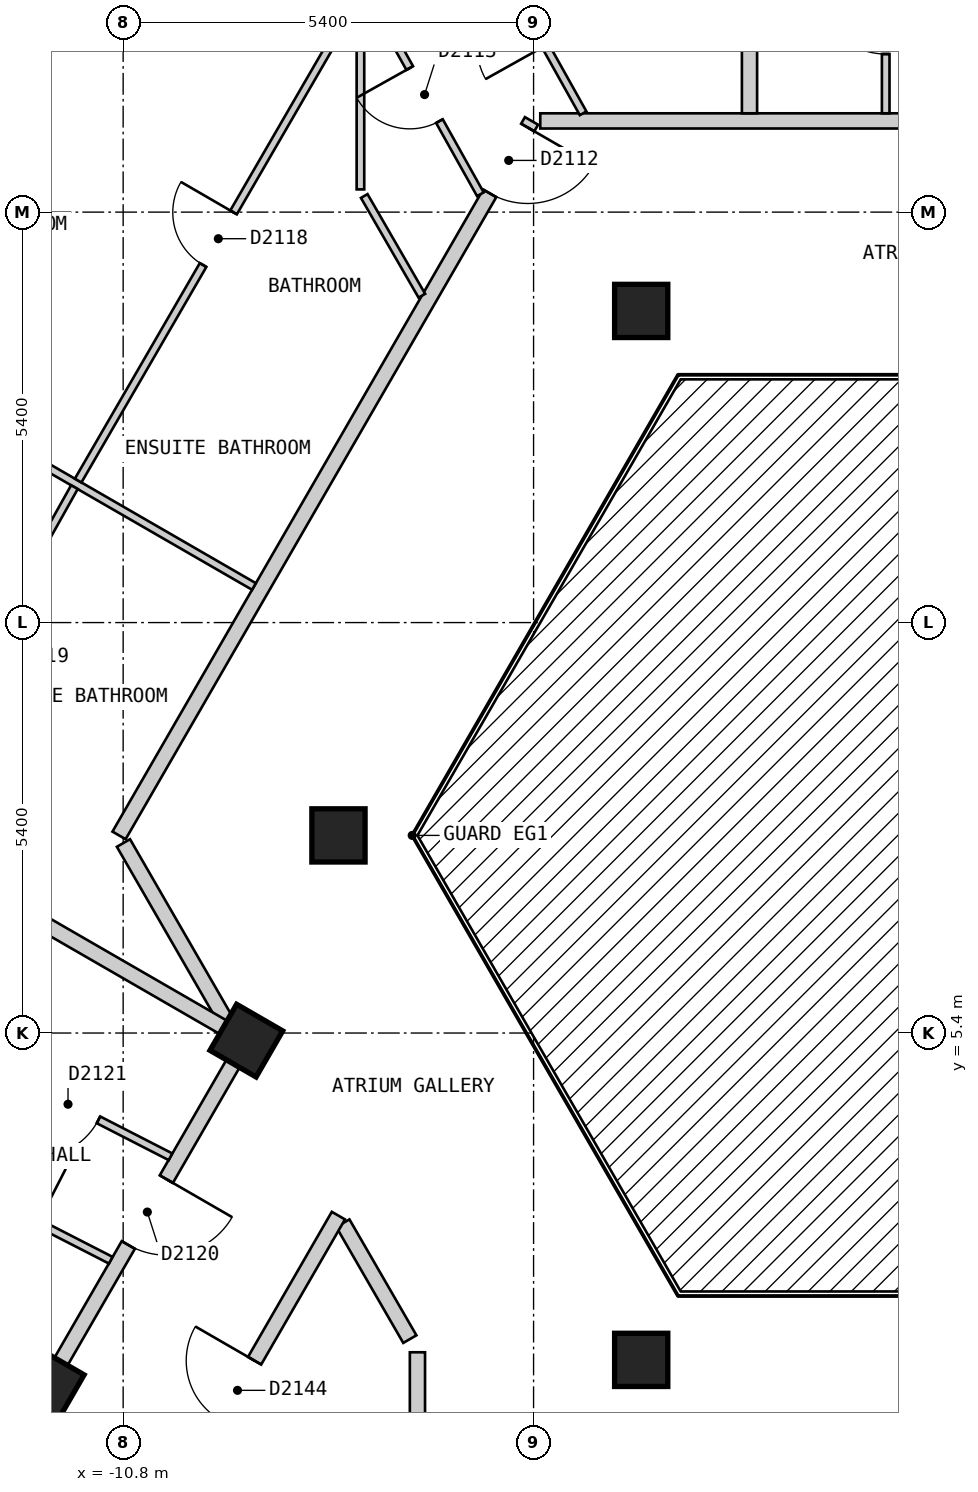
"""IFC4 building model, lengths in metres.
Left out: names, types, materials, properties, quantities, classifications, styles, units other than length and angle.
Written with IfcOpenShell. Run it as: python <this file> out.ifc"""

import sys

from ifc_helpers import new_model, si_unit, direction, frame, frame_2d, origin, origin_2d, place, context, subcontext, project, spatial, rectangle, extrude, element, fill, save


model = new_model("IFC4")
c1 = context("Model", 3, precision=1e-05, world=origin(), true_north=direction((0.0, 1.0)))
c2 = subcontext(c1, "Body", "Model", "MODEL_VIEW")
j1 = project(units=[si_unit("LENGTHUNIT", "METRE"), si_unit("PLANEANGLEUNIT", "RADIAN")], contexts=[c1])
p1 = place(None, origin())
s1 = spatial("IfcSite", under=j1, at=p1, CompositionType="ELEMENT")
p2 = place(p1, origin())
s2 = spatial("IfcBuilding", under=s1, at=p2, CompositionType="ELEMENT")
p3 = place(p2, frame((0.0, 0.0, 217.8)))
s3 = spatial("IfcBuildingStorey", under=s2, at=p3, CompositionType="ELEMENT", Elevation=217.8)
for number, where, z_axis, x_axis in (
    (1, (-3.984, 14.9, 0.0), (0.0, 0.0, 1.0), (1.0, 0.0, 0.0)),
    (2, (-7.967, 8.0, 0.0), (0.0, 0.0, 1.0), (1.0, 0.0, 0.0)),
    (3, (-9.179, 5.3, 0.0), (0.0, 0.0, 1.0), (-0.5, -0.866, 0.0)),
    (4, (-3.984, 1.1, 0.0), (0.0, 0.0, 1.0), (1.0, 0.0, 0.0)),
    (5, (-11.792, 0.775, 0.0), (0.0, 0.0, 1.0), (-0.5, -0.866, 0.0)),
):
    element("IfcColumn", number, at=place(p3, frame(where, z_axis=z_axis, x_axis=x_axis)), inside=s3, PredefinedType="COLUMN", context=c2, shape_type="SweptSolid", body=[
        extrude(rectangle(XDim=0.7, YDim=0.7, at=origin_2d()), origin(), (0.0, 0.0, 1.0), 3.0),
    ])
p4 = place(p3, frame((-10.796, 7.9, 0.0), z_axis=(0.0, 0.0, 1.0), x_axis=(0.499698840221, -0.866199208659, 0.0)))
e6 = element("IfcWall", 6, at=p4, inside=s3, PredefinedType="PARTITIONING", context=c2, shape_type="SweptSolid", body=[
    extrude(rectangle(XDim=2.685, YDim=0.2, at=frame_2d((1.343, 0.0))), origin(), (0.0, 0.0, 1.0), 2.7),
])
p5 = place(p3, frame((-7.909, 2.898, 0.0), z_axis=(0.0, 0.0, 1.0), x_axis=(0.50019444547, -0.865913111531, 0.0)))
e7 = element("IfcWall", 7, at=p5, inside=s3, PredefinedType="PARTITIONING", context=c2, shape_type="SweptSolid", body=[
    extrude(rectangle(XDim=1.761, YDim=0.2, at=frame_2d((0.88, 0.0))), origin(), (0.0, 0.0, 1.0), 2.7),
])
p6 = place(p3, frame((-5.312, 17.4, 0.0), z_axis=(0.0, 0.0, 1.0), x_axis=(1.0, 0.0, 0.0)))
e8 = element("IfcWall", 8, at=p6, inside=s3, PredefinedType="PARTITIONING", context=c2, shape_type="SweptSolid", body=[
    extrude(rectangle(XDim=10.739, YDim=0.2, at=frame_2d((5.37, 0.0))), origin(), (0.0, 0.0, 1.0), 2.7),
])
p7 = place(p6, frame((9.534, 0.0, 0.0)))
e9 = element("IfcOpeningElement", 9, at=p7, cuts=e8, PredefinedType="OPENING", context=c2, shape_type="SweptSolid", body=[
    extrude(rectangle(XDim=1.0, YDim=2.1, at=frame_2d((0.5, 1.05))), frame((0.0, 0.11, 0.0), z_axis=(0.0, -1.0, 0.0), x_axis=(1.0, 0.0, 0.0)), (0.0, 0.0, 1.0), 0.22),
])
p8 = place(p6, frame((4.812, 0.0, 0.0)))
e10 = element("IfcOpeningElement", 10, at=p8, cuts=e8, PredefinedType="OPENING", context=c2, shape_type="SweptSolid", body=[
    extrude(rectangle(XDim=1.0, YDim=2.1, at=frame_2d((0.5, 1.05))), frame((0.0, 0.11, 0.0), z_axis=(0.0, -1.0, 0.0), x_axis=(1.0, 0.0, 0.0)), (0.0, 0.0, 1.0), 0.22),
])
p9 = place(p3, frame((-10.623, -1.6, 0.0), z_axis=(0.0, 0.0, 1.0), x_axis=(0.500040865889, 0.866001808567, 0.0)))
e11 = element("IfcWall", 11, at=p9, inside=s3, PredefinedType="PARTITIONING", context=c2, shape_type="SweptSolid", body=[
    extrude(rectangle(XDim=5.31, YDim=0.2, at=frame_2d((2.655, 0.0))), origin(), (0.0, 0.0, 1.0), 2.7),
])
p10 = place(p9, frame((2.205, 0.0, 0.0)))
e12 = element("IfcOpeningElement", 12, at=p10, cuts=e11, PredefinedType="OPENING", context=c2, shape_type="SweptSolid", body=[
    extrude(rectangle(XDim=0.9, YDim=2.1, at=frame_2d((0.45, 1.05))), frame((0.0, 0.11, 0.0), z_axis=(0.0, -1.0, 0.0), x_axis=(1.0, 0.0, 0.0)), (0.0, 0.0, 1.0), 0.22),
])
p11 = place(p3, frame((-13.106, -1.5, 0.0), z_axis=(0.0, 0.0, 1.0), x_axis=(0.500025705601, 0.86601056214, 0.0)))
e13 = element("IfcWall", 13, at=p11, inside=s3, PredefinedType="PARTITIONING", context=c2, shape_type="SweptSolid", body=[
    extrude(rectangle(XDim=7.735, YDim=0.2, at=frame_2d((3.868, 0.0))), origin(), (0.0, 0.0, 1.0), 2.7),
])
p12 = place(p11, frame((4.748, 0.0, 0.0)))
e14 = element("IfcOpeningElement", 14, at=p12, cuts=e13, PredefinedType="OPENING", context=c2, shape_type="SweptSolid", body=[
    extrude(rectangle(XDim=1.0, YDim=2.1, at=frame_2d((0.5, 1.05))), frame((0.0, 0.11, 0.0), z_axis=(0.0, -1.0, 0.0), x_axis=(1.0, 0.0, 0.0)), (0.0, 0.0, 1.0), 0.22),
])
p13 = place(p3, frame((-10.854, 8.0, 0.0), z_axis=(0.0, 0.0, 1.0), x_axis=(0.499997637144, 0.866026767976, 0.0)))
e15 = element("IfcWall", 15, at=p13, inside=s3, PredefinedType="PARTITIONING", context=c2, shape_type="SweptSolid", body=[
    extrude(rectangle(XDim=10.854, YDim=0.2, at=frame_2d((5.427, 0.0))), origin(), (0.0, 0.0, 1.0), 2.7),
])
p14 = place(p13, frame((9.754, 0.0, 0.0)))
e16 = element("IfcOpeningElement", 16, at=p14, cuts=e15, PredefinedType="OPENING", context=c2, shape_type="SweptSolid", body=[
    extrude(rectangle(XDim=1.0, YDim=2.1, at=frame_2d((0.5, 1.05))), frame((0.0, 0.11, 0.0), z_axis=(0.0, -1.0, 0.0), x_axis=(1.0, 0.0, 0.0)), (0.0, 0.0, 1.0), 0.22),
])
p15 = place(p3, frame((-6.928, -2.799, 0.0), z_axis=(0.0, 0.0, 1.0), x_axis=(0.0, 1.0, 0.0)))
e17 = element("IfcWall", 17, at=p15, inside=s3, PredefinedType="PARTITIONING", context=c2, shape_type="SweptSolid", body=[
    extrude(rectangle(XDim=3.999, YDim=0.2, at=frame_2d((2.0, 0.0))), origin(), (0.0, 0.0, 1.0), 2.7),
])
p16 = place(p3, frame((-7.628, 16.412, 0.0), z_axis=(0.0, 0.0, 1.0), x_axis=(0.500159472144, -0.86593331292, 0.0)))
e18 = element("IfcWall", 18, at=p16, inside=s3, PredefinedType="PARTITIONING", context=c2, shape_type="SweptSolid", body=[
    extrude(rectangle(XDim=1.515, YDim=0.1, at=frame_2d((0.758, 0.0))), origin(), (0.0, 0.0, 1.0), 2.7),
])
p17 = place(p3, frame((-6.211, 20.115, 0.0), z_axis=(0.0, 0.0, 1.0), x_axis=(0.488221234931, -0.872719901092, 0.0)))
e19 = element("IfcWall", 19, at=p17, inside=s3, PredefinedType="PARTITIONING", context=c2, shape_type="SweptSolid", body=[
    extrude(rectangle(XDim=2.996, YDim=0.1, at=frame_2d((1.498, 0.0))), origin(), (0.0, 0.0, 1.0), 2.7),
])
p18 = place(p17, frame((1.077, 0.0, 0.0)))
e20 = element("IfcOpeningElement", 20, at=p18, cuts=e19, PredefinedType="OPENING", context=c2, shape_type="SweptSolid", body=[
    extrude(rectangle(XDim=0.9, YDim=2.1, at=frame_2d((0.45, 1.05))), frame((0.0, 0.06, 0.0), z_axis=(0.0, -1.0, 0.0), x_axis=(1.0, 0.0, 0.0)), (0.0, 0.0, 1.0), 0.12),
])
p19 = place(p3, frame((-7.575, 19.07, 0.0), z_axis=(0.0, 0.0, 1.0), x_axis=(0.488413788688, -0.872612153834, 0.0)))
e21 = element("IfcWall", 21, at=p19, inside=s3, PredefinedType="PARTITIONING", context=c2, shape_type="SweptSolid", body=[
    extrude(rectangle(XDim=3.02, YDim=0.1, at=frame_2d((1.51, 0.0))), origin(), (0.0, 0.0, 1.0), 2.7),
])
p20 = place(p19, frame((1.117, 0.0, 0.0)))
e22 = element("IfcOpeningElement", 22, at=p20, cuts=e21, PredefinedType="OPENING", context=c2, shape_type="SweptSolid", body=[
    extrude(rectangle(XDim=0.8, YDim=2.1, at=frame_2d((0.4, 1.05))), frame((0.0, 0.06, 0.0), z_axis=(0.0, -1.0, 0.0), x_axis=(1.0, 0.0, 0.0)), (0.0, 0.0, 1.0), 0.12),
])
p21 = place(p3, frame((-12.917, 5.177, 0.0), z_axis=(0.0, 0.0, 1.0), x_axis=(0.889829844516, -0.456292502467, 0.0)))
e23 = element("IfcWall", 23, at=p21, inside=s3, PredefinedType="PARTITIONING", context=c2, shape_type="SweptSolid", body=[
    extrude(rectangle(XDim=3.079, YDim=0.1, at=frame_2d((1.54, 0.0))), origin(), (0.0, 0.0, 1.0), 2.7),
])
p22 = place(p21, frame((1.114, 0.0, 0.0)))
e24 = element("IfcOpeningElement", 24, at=p22, cuts=e23, PredefinedType="OPENING", context=c2, shape_type="SweptSolid", body=[
    extrude(rectangle(XDim=0.9, YDim=2.1, at=frame_2d((0.45, 1.05))), frame((0.0, 0.06, 0.0), z_axis=(0.0, -1.0, 0.0), x_axis=(1.0, 0.0, 0.0)), (0.0, 0.0, 1.0), 0.12),
])
p23 = place(p3, frame((-13.634, 3.78, 0.0), z_axis=(0.0, 0.0, 1.0), x_axis=(0.889908901513, -0.456138298116, 0.0)))
e25 = element("IfcWall", 25, at=p23, inside=s3, PredefinedType="PARTITIONING", context=c2, shape_type="SweptSolid", body=[
    extrude(rectangle(XDim=3.002, YDim=0.1, at=frame_2d((1.501, 0.0))), origin(), (0.0, 0.0, 1.0), 2.7),
])
p24 = place(p23, frame((1.126, 0.0, 0.0)))
e26 = element("IfcOpeningElement", 26, at=p24, cuts=e25, PredefinedType="OPENING", context=c2, shape_type="SweptSolid", body=[
    extrude(rectangle(XDim=0.8, YDim=2.1, at=frame_2d((0.4, 1.05))), frame((0.0, 0.06, 0.0), z_axis=(0.0, -1.0, 0.0), x_axis=(1.0, 0.0, 0.0)), (0.0, 0.0, 1.0), 0.12),
])
p25 = place(p3, frame((-15.314, 14.875, 0.0), z_axis=(0.0, 0.0, 1.0), x_axis=(0.866001485781, -0.500041424909, 0.0)))
e27 = element("IfcWall", 27, at=p25, inside=s3, PredefinedType="PARTITIONING", context=c2, shape_type="SweptSolid", body=[
    extrude(rectangle(XDim=7.2, YDim=0.1, at=frame_2d((3.6, 0.0))), origin(), (0.0, 0.0, 1.0), 2.7),
])
p26 = place(p25, frame((1.8, 0.0, 0.0)))
e28 = element("IfcOpeningElement", 28, at=p26, cuts=e27, PredefinedType="OPENING", context=c2, shape_type="SweptSolid", body=[
    extrude(rectangle(XDim=0.9, YDim=2.1, at=frame_2d((0.45, 1.05))), frame((0.0, 0.06, 0.0), z_axis=(0.0, -1.0, 0.0), x_axis=(1.0, 0.0, 0.0)), (0.0, 0.0, 1.0), 0.12),
])
p27 = place(p3, frame((-11.392, 12.668, 0.0), z_axis=(0.0, 0.0, 1.0), x_axis=(0.501440551074, 0.865192102217, 0.0)))
e29 = element("IfcWall", 29, at=p27, inside=s3, PredefinedType="PARTITIONING", context=c2, shape_type="SweptSolid", body=[
    extrude(rectangle(XDim=7.307, YDim=0.1, at=frame_2d((3.654, 0.0))), origin(), (0.0, 0.0, 1.0), 2.7),
])
p28 = place(p27, frame((3.278, 0.0, 0.0)))
e30 = element("IfcOpeningElement", 30, at=p28, cuts=e29, PredefinedType="OPENING", context=c2, shape_type="SweptSolid", body=[
    extrude(rectangle(XDim=0.8, YDim=2.1, at=frame_2d((0.4, 1.05))), frame((0.0, 0.06, 0.0), z_axis=(0.0, -1.0, 0.0), x_axis=(1.0, 0.0, 0.0)), (0.0, 0.0, 1.0), 0.12),
])
p29 = place(p3, frame((-13.921, 8.153, 0.0), z_axis=(0.0, 0.0, 1.0), x_axis=(0.488568218554, 0.872525699231, 0.0)))
e31 = element("IfcWall", 31, at=p29, inside=s3, PredefinedType="PARTITIONING", context=c2, shape_type="SweptSolid", body=[
    extrude(rectangle(XDim=5.076, YDim=0.1, at=frame_2d((2.538, 0.0))), origin(), (0.0, 0.0, 1.0), 2.7),
])
p30 = place(p29, frame((2.113, 0.0, 0.0)))
e32 = element("IfcOpeningElement", 32, at=p30, cuts=e31, PredefinedType="OPENING", context=c2, shape_type="SweptSolid", body=[
    extrude(rectangle(XDim=0.8, YDim=2.1, at=frame_2d((0.4, 1.05))), frame((0.0, 0.06, 0.0), z_axis=(0.0, -1.0, 0.0), x_axis=(1.0, 0.0, 0.0)), (0.0, 0.0, 1.0), 0.12),
])
p31 = place(p3, frame((-7.678, 16.499, 0.0), z_axis=(0.0, 0.0, 1.0), x_axis=(0.0, 1.0, 0.0)))
e33 = element("IfcWall", 33, at=p31, inside=s3, PredefinedType="PARTITIONING", context=c2, shape_type="SweptSolid", body=[
    extrude(rectangle(XDim=5.801, YDim=0.1, at=frame_2d((2.9, 0.0))), origin(), (0.0, 0.0, 1.0), 2.7),
])
p32 = place(p31, frame((3.44, 0.0, 0.0)))
e34 = element("IfcOpeningElement", 34, at=p32, cuts=e33, PredefinedType="OPENING", context=c2, shape_type="SweptSolid", body=[
    extrude(rectangle(XDim=0.9, YDim=2.1, at=frame_2d((0.45, 1.05))), frame((0.0, 0.06, 0.0), z_axis=(0.0, -1.0, 0.0), x_axis=(1.0, 0.0, 0.0)), (0.0, 0.0, 1.0), 0.12),
])
p33 = place(p3, frame((-0.767, 17.5, 0.0), z_axis=(0.0, 0.0, 1.0), x_axis=(0.0, 1.0, 0.0)))
e35 = element("IfcWall", 35, at=p33, inside=s3, PredefinedType="PARTITIONING", context=c2, shape_type="SweptSolid", body=[
    extrude(rectangle(XDim=2.559, YDim=0.1, at=frame_2d((1.28, 0.0))), origin(), (0.0, 0.0, 1.0), 2.7),
])
p34 = place(p33, frame((0.78, 0.0, 0.0)))
e36 = element("IfcOpeningElement", 36, at=p34, cuts=e35, PredefinedType="OPENING", context=c2, shape_type="SweptSolid", body=[
    extrude(rectangle(XDim=0.9, YDim=2.1, at=frame_2d((0.45, 1.05))), frame((0.0, 0.06, 0.0), z_axis=(0.0, -1.0, 0.0), x_axis=(1.0, 0.0, 0.0)), (0.0, 0.0, 1.0), 0.12),
])
p35 = place(p3, frame((-2.559, 20.22, 0.0), z_axis=(0.0, 0.0, 1.0), x_axis=(0.0, -1.0, 0.0)))
e37 = element("IfcWall", 37, at=p35, inside=s3, PredefinedType="PARTITIONING", context=c2, shape_type="SweptSolid", body=[
    extrude(rectangle(XDim=2.72, YDim=0.2, at=frame_2d((1.36, 0.0))), origin(), (0.0, 0.0, 1.0), 2.7),
])
p36 = place(p3, frame((-17.926, 10.35, 0.0), z_axis=(0.0, 0.0, 1.0), x_axis=(0.866018411306, -0.500012111133, 0.0)))
e38 = element("IfcWall", 38, at=p36, inside=s3, PredefinedType="PARTITIONING", context=c2, shape_type="SweptSolid", body=[
    extrude(rectangle(XDim=9.898, YDim=0.2, at=frame_2d((4.949, 0.0))), origin(), (0.0, 0.0, 1.0), 2.7),
])
p37 = place(p34, origin())
e39 = element("IfcDoor", 39, at=p37, inside=s3, OperationType="SINGLE_SWING_RIGHT", PredefinedType="DOOR", context=c2, shape_type="SweptSolid", body=[
    extrude(rectangle(XDim=0.9, YDim=2.1, at=frame_2d((0.45, 1.05))), frame((0.0, 0.025, 0.0), z_axis=(0.0, -1.0, 0.0), x_axis=(1.0, 0.0, 0.0)), (0.0, 0.0, 1.0), 0.05),
])
fill(e36, e39)
p38 = place(p14, origin())
e40 = element("IfcDoor", 40, at=p38, inside=s3, OperationType="SINGLE_SWING_RIGHT", PredefinedType="DOOR", context=c2, shape_type="SweptSolid", body=[
    extrude(rectangle(XDim=1.0, YDim=2.1, at=frame_2d((0.5, 1.05))), frame((0.0, 0.025, 0.0), z_axis=(0.0, -1.0, 0.0), x_axis=(1.0, 0.0, 0.0)), (0.0, 0.0, 1.0), 0.05),
])
fill(e16, e40)
p39 = place(p20, origin())
e41 = element("IfcDoor", 41, at=p39, inside=s3, OperationType="SINGLE_SWING_LEFT", PredefinedType="DOOR", context=c2, shape_type="SweptSolid", body=[
    extrude(rectangle(XDim=0.8, YDim=2.1, at=frame_2d((0.4, 1.05))), frame((0.0, 0.025, 0.0), z_axis=(0.0, -1.0, 0.0), x_axis=(1.0, 0.0, 0.0)), (0.0, 0.0, 1.0), 0.05),
])
fill(e22, e41)
p40 = place(p28, origin())
e42 = element("IfcDoor", 42, at=p40, inside=s3, OperationType="SINGLE_SWING_RIGHT", PredefinedType="DOOR", context=c2, shape_type="SweptSolid", body=[
    extrude(rectangle(XDim=0.8, YDim=2.1, at=frame_2d((0.4, 1.05))), frame((0.0, 0.025, 0.0), z_axis=(0.0, -1.0, 0.0), x_axis=(1.0, 0.0, 0.0)), (0.0, 0.0, 1.0), 0.05),
])
fill(e30, e42)
p41 = place(p12, origin())
e43 = element("IfcDoor", 43, at=p41, inside=s3, OperationType="SINGLE_SWING_RIGHT", PredefinedType="DOOR", context=c2, shape_type="SweptSolid", body=[
    extrude(rectangle(XDim=1.0, YDim=2.1, at=frame_2d((0.5, 1.05))), frame((0.0, 0.025, 0.0), z_axis=(0.0, -1.0, 0.0), x_axis=(1.0, 0.0, 0.0)), (0.0, 0.0, 1.0), 0.05),
])
fill(e14, e43)
p42 = place(p22, origin())
e44 = element("IfcDoor", 44, at=p42, inside=s3, OperationType="SINGLE_SWING_LEFT", PredefinedType="DOOR", context=c2, shape_type="SweptSolid", body=[
    extrude(rectangle(XDim=0.9, YDim=2.1, at=frame_2d((0.45, 1.05))), frame((0.0, 0.025, 0.0), z_axis=(0.0, -1.0, 0.0), x_axis=(1.0, 0.0, 0.0)), (0.0, 0.0, 1.0), 0.05),
])
fill(e24, e44)
p43 = place(p10, origin())
e45 = element("IfcDoor", 45, at=p43, inside=s3, OperationType="SINGLE_SWING_RIGHT", PredefinedType="DOOR", context=c2, shape_type="SweptSolid", body=[
    extrude(rectangle(XDim=0.9, YDim=2.1, at=frame_2d((0.45, 1.05))), frame((0.0, 0.025, 0.0), z_axis=(0.0, -1.0, 0.0), x_axis=(1.0, 0.0, 0.0)), (0.0, 0.0, 1.0), 0.05),
])
fill(e12, e45)
save(model, sys.argv[1])
